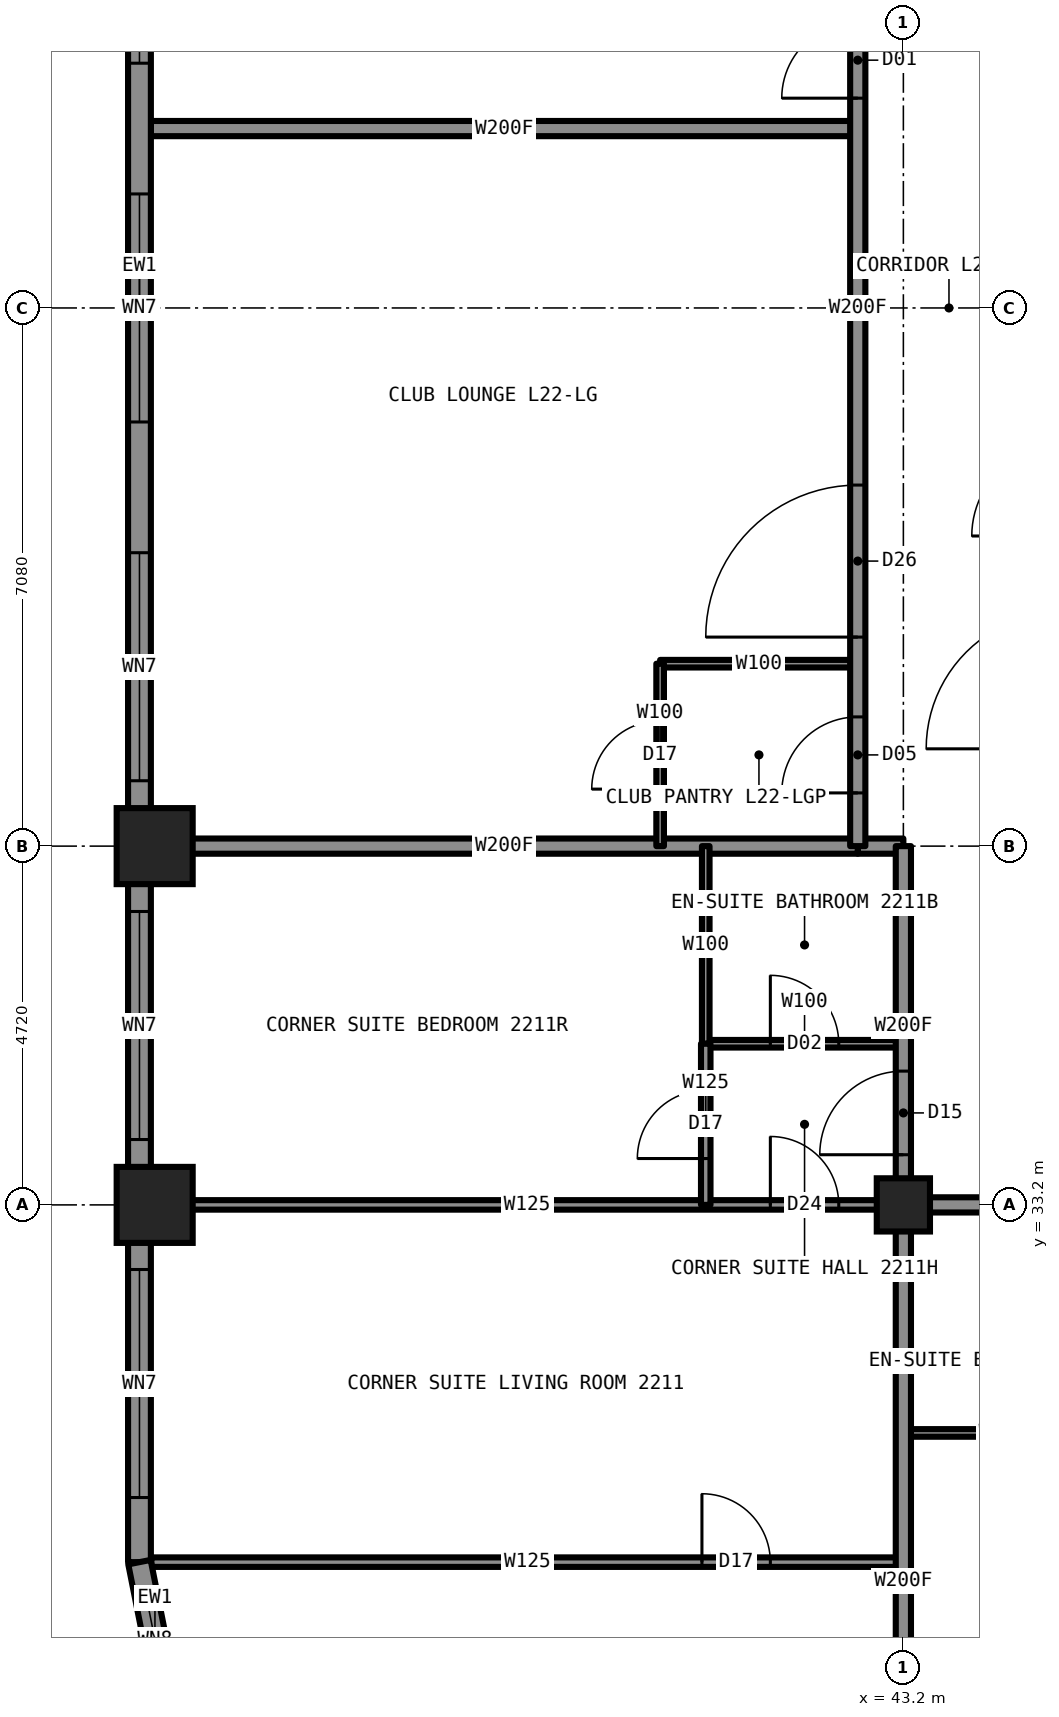
"""IFC4 building model, lengths in metres.
Left out: names, types, materials, properties, quantities, classifications, styles, units other than length and angle.
Written with IfcOpenShell. Run it as: python <this file> out.ifc"""

import sys

from ifc_helpers import new_model, si_unit, direction, frame, frame_2d, origin, origin_2d, place, context, subcontext, project, spatial, rectangle, hollow_rectangle, i_section, extrude, element, fill, save


model = new_model("IFC4")
c1 = context("Model", 3, precision=1e-05, world=origin(), true_north=direction((0.0, 1.0)))
c2 = subcontext(c1, "Body", "Model", "MODEL_VIEW")
j1 = project(units=[si_unit("LENGTHUNIT", "METRE"), si_unit("PLANEANGLEUNIT", "RADIAN")], contexts=[c1])
p1 = place(None, origin())
s1 = spatial("IfcSite", under=j1, at=p1, CompositionType="ELEMENT")
p2 = place(p1, origin())
s2 = spatial("IfcBuilding", under=s1, at=p2, CompositionType="ELEMENT")
p3 = place(p2, frame((0.0, 0.0, 81.0)))
s3 = spatial("IfcBuildingStorey", under=s2, at=p3, CompositionType="ELEMENT", Elevation=81.0)
for number, where, z_axis, x_axis in (
    (1, (33.35, 33.2, 0.0), (0.0, 0.0, 1.0), (1.0, 0.0, 0.0)),
    (2, (33.35, 37.92, 0.0), (0.0, 0.0, 1.0), (1.0, 0.0, 0.0)),
):
    element("IfcColumn", number, at=place(p3, frame(where, z_axis=z_axis, x_axis=x_axis)), inside=s3, PredefinedType="COLUMN", context=c2, shape_type="SweptSolid", body=[
        extrude(i_section(OverallWidth=0.432, OverallDepth=0.498, WebThickness=0.056, FlangeThickness=0.089, at=origin_2d()), origin(), (0.0, 0.0, 1.0), 3.5),
    ])
p4 = place(p3, frame((43.2, 33.2, 0.0), z_axis=(0.0, 0.0, 1.0), x_axis=(1.0, 0.0, 0.0)))
e3 = element("IfcColumn", 3, at=p4, inside=s3, PredefinedType="COLUMN", context=c2, shape_type="SweptSolid", body=[
    extrude(hollow_rectangle(XDim=0.7, YDim=0.7, WallThickness=0.06, at=origin_2d()), origin(), (0.0, 0.0, 1.0), 3.5),
])
p5 = place(p3, frame((43.2, 33.2, 0.0), z_axis=(0.0, 0.0, 1.0), x_axis=(1.0, 0.0, 0.0)))
e4 = element("IfcWall", 4, at=p5, inside=s3, PredefinedType="PARTITIONING", context=c2, shape_type="SweptSolid", body=[
    extrude(rectangle(XDim=23.6, YDim=0.2, at=frame_2d((11.8, 0.0))), origin(), (0.0, 0.0, 1.0), 3.33),
])
p6 = place(p5, frame((3.0, 0.0, 0.0)))
e5 = element("IfcOpeningElement", 5, at=p6, cuts=e4, PredefinedType="OPENING", context=c2, shape_type="SweptSolid", body=[
    extrude(rectangle(XDim=1.0, YDim=2.2, at=frame_2d((0.5, 1.1))), frame((0.0, 0.11, 0.0), z_axis=(0.0, -1.0, 0.0), x_axis=(1.0, 0.0, 0.0)), (0.0, 0.0, 1.0), 0.22),
])
p7 = place(p5, frame((11.29, 0.0, 0.0)))
e6 = element("IfcOpeningElement", 6, at=p7, cuts=e4, PredefinedType="OPENING", context=c2, shape_type="SweptSolid", body=[
    extrude(rectangle(XDim=1.1, YDim=2.2, at=frame_2d((0.55, 1.1))), frame((0.0, 0.11, 0.0), z_axis=(0.0, -1.0, 0.0), x_axis=(1.0, 0.0, 0.0)), (0.0, 0.0, 1.0), 0.22),
])
p8 = place(p3, frame((33.3, 33.2, 0.0), z_axis=(0.0, 0.0, 1.0), x_axis=(1.0, 0.0, 0.0)))
e7 = element("IfcWall", 7, at=p8, inside=s3, PredefinedType="PARTITIONING", context=c2, shape_type="SweptSolid", body=[
    extrude(rectangle(XDim=9.9, YDim=0.125, at=frame_2d((4.95, 0.0))), origin(), (0.0, 0.0, 1.0), 2.573),
])
p9 = place(p8, frame((8.15, 0.0, 0.0)))
e8 = element("IfcOpeningElement", 8, at=p9, cuts=e7, PredefinedType="OPENING", context=c2, shape_type="SweptSolid", body=[
    extrude(rectangle(XDim=0.9, YDim=2.2, at=frame_2d((0.45, 1.1))), frame((0.0, 0.073, 0.0), z_axis=(0.0, -1.0, 0.0), x_axis=(1.0, 0.0, 0.0)), (0.0, 0.0, 1.0), 0.145),
])
p10 = place(p3, frame((43.2, 30.2, 0.0), z_axis=(0.0, 0.0, 1.0), x_axis=(1.0, 0.0, 0.0)))
e9 = element("IfcWall", 9, at=p10, inside=s3, PredefinedType="PARTITIONING", context=c2, shape_type="SweptSolid", body=[
    extrude(rectangle(XDim=2.6, YDim=0.1, at=frame_2d((1.3, 0.0))), origin(), (0.0, 0.0, 1.0), 3.33),
])
p11 = place(p3, frame((33.306, 28.5, 0.0), z_axis=(0.0, 0.0, 1.0), x_axis=(1.0, 0.0, 0.0)))
e10 = element("IfcWall", 10, at=p11, inside=s3, PredefinedType="PARTITIONING", context=c2, shape_type="SweptSolid", body=[
    extrude(rectangle(XDim=9.894, YDim=0.125, at=frame_2d((4.947, 0.0))), origin(), (0.0, 0.0, 1.0), 3.33),
])
p12 = place(p11, frame((7.244, 0.0, 0.0)))
e11 = element("IfcOpeningElement", 11, at=p12, cuts=e10, PredefinedType="OPENING", context=c2, shape_type="SweptSolid", body=[
    extrude(rectangle(XDim=0.9, YDim=2.2, at=frame_2d((0.45, 1.1))), frame((0.0, 0.073, 0.0), z_axis=(0.0, -1.0, 0.0), x_axis=(1.0, 0.0, 0.0)), (0.0, 0.0, 1.0), 0.145),
])
p13 = place(p3, frame((40.0, 40.32, 0.0), z_axis=(0.0, 0.0, 1.0), x_axis=(1.0, 0.0, 0.0)))
e12 = element("IfcWall", 12, at=p13, inside=s3, PredefinedType="PARTITIONING", context=c2, shape_type="SweptSolid", body=[
    extrude(rectangle(XDim=2.6, YDim=0.1, at=frame_2d((1.3, 0.0))), origin(), (0.0, 0.0, 1.0), 2.723),
])
p14 = place(p3, frame((42.6, 37.92, 0.0), z_axis=(0.0, 0.0, 1.0), x_axis=(1.0, 0.0, 0.0)))
e13 = element("IfcWall", 13, at=p14, inside=s3, PredefinedType="PARTITIONING", context=c2, shape_type="SweptSolid", body=[
    extrude(rectangle(XDim=0.6, YDim=0.2, at=frame_2d((0.3, 0.0))), origin(), (0.0, 0.0, 1.0), 2.573),
])
p15 = place(p3, frame((33.3, 37.92, 0.0), z_axis=(0.0, 0.0, 1.0), x_axis=(1.0, 0.0, 0.0)))
e14 = element("IfcWall", 14, at=p15, inside=s3, PredefinedType="PARTITIONING", context=c2, shape_type="SweptSolid", body=[
    extrude(rectangle(XDim=9.3, YDim=0.2, at=frame_2d((4.65, 0.0))), origin(), (0.0, 0.0, 1.0), 2.573),
])
p16 = place(p3, frame((40.6, 35.32, 0.0), z_axis=(0.0, 0.0, 1.0), x_axis=(1.0, 0.0, 0.0)))
e15 = element("IfcWall", 15, at=p16, inside=s3, PredefinedType="PARTITIONING", context=c2, shape_type="SweptSolid", body=[
    extrude(rectangle(XDim=2.6, YDim=0.1, at=frame_2d((1.3, 0.0))), origin(), (0.0, 0.0, 1.0), 3.33),
])
p17 = place(p16, frame((0.85, 0.0, 0.0)))
e16 = element("IfcOpeningElement", 16, at=p17, cuts=e15, PredefinedType="OPENING", context=c2, shape_type="SweptSolid", body=[
    extrude(rectangle(XDim=0.9, YDim=2.1, at=frame_2d((0.45, 1.05))), frame((0.0, 0.06, 0.0), z_axis=(0.0, -1.0, 0.0), x_axis=(1.0, 0.0, 0.0)), (0.0, 0.0, 1.0), 0.12),
])
p18 = place(p3, frame((33.3, 47.36, 0.0), z_axis=(0.0, 0.0, 1.0), x_axis=(1.0, 0.0, 0.0)))
e17 = element("IfcWall", 17, at=p18, inside=s3, PredefinedType="PARTITIONING", context=c2, shape_type="SweptSolid", body=[
    extrude(rectangle(XDim=9.3, YDim=0.2, at=frame_2d((4.65, 0.0))), origin(), (0.0, 0.0, 1.0), 2.723),
])
p19 = place(p3, frame((43.2, 33.2, 0.0), z_axis=(0.0, 0.0, 1.0), x_axis=(0.0, 1.0, 0.0)))
e18 = element("IfcWall", 18, at=p19, inside=s3, PredefinedType="PARTITIONING", context=c2, shape_type="SweptSolid", body=[
    extrude(rectangle(XDim=4.72, YDim=0.2, at=frame_2d((2.36, 0.0))), origin(), (0.0, 0.0, 1.0), 3.33),
])
p20 = place(p19, frame((0.66, 0.0, 0.0)))
e19 = element("IfcOpeningElement", 19, at=p20, cuts=e18, PredefinedType="OPENING", context=c2, shape_type="SweptSolid", body=[
    extrude(rectangle(XDim=1.1, YDim=2.2, at=frame_2d((0.55, 1.1))), frame((0.0, 0.11, 0.0), z_axis=(0.0, -1.0, 0.0), x_axis=(1.0, 0.0, 0.0)), (0.0, 0.0, 1.0), 0.22),
])
p21 = place(p3, frame((43.2, 23.3, 0.0), z_axis=(0.0, 0.0, 1.0), x_axis=(0.0, 1.0, 0.0)))
e20 = element("IfcWall", 20, at=p21, inside=s3, PredefinedType="PARTITIONING", context=c2, shape_type="SweptSolid", body=[
    extrude(rectangle(XDim=9.9, YDim=0.2, at=frame_2d((4.95, 0.0))), origin(), (0.0, 0.0, 1.0), 2.573),
])
p22 = place(p3, frame((42.6, 37.92, 0.0), z_axis=(0.0, 0.0, 1.0), x_axis=(0.0, 1.0, 0.0)))
e21 = element("IfcWall", 21, at=p22, inside=s3, PredefinedType="PARTITIONING", context=c2, shape_type="SweptSolid", body=[
    extrude(rectangle(XDim=14.16, YDim=0.2, at=frame_2d((7.08, 0.0))), origin(), (0.0, 0.0, 1.0), 3.33),
])
p23 = place(p22, frame((9.84, 0.0, 0.0)))
e22 = element("IfcOpeningElement", 22, at=p23, cuts=e21, PredefinedType="OPENING", context=c2, shape_type="SweptSolid", body=[
    extrude(rectangle(XDim=1.0, YDim=2.2, at=frame_2d((0.5, 1.1))), frame((0.0, 0.11, 0.0), z_axis=(0.0, -1.0, 0.0), x_axis=(1.0, 0.0, 0.0)), (0.0, 0.0, 1.0), 0.22),
])
p24 = place(p22, frame((2.75, 0.0, 0.0)))
e23 = element("IfcOpeningElement", 23, at=p24, cuts=e21, PredefinedType="OPENING", context=c2, shape_type="SweptSolid", body=[
    extrude(rectangle(XDim=2.0, YDim=2.4, at=frame_2d((1.0, 1.2))), frame((0.0, 0.11, 0.0), z_axis=(0.0, -1.0, 0.0), x_axis=(1.0, 0.0, 0.0)), (0.0, 0.0, 1.0), 0.22),
])
p25 = place(p22, frame((0.7, 0.0, 0.0)))
e24 = element("IfcOpeningElement", 24, at=p25, cuts=e21, PredefinedType="OPENING", context=c2, shape_type="SweptSolid", body=[
    extrude(rectangle(XDim=1.0, YDim=2.1, at=frame_2d((0.5, 1.05))), frame((0.0, 0.11, 0.0), z_axis=(0.0, -1.0, 0.0), x_axis=(1.0, 0.0, 0.0)), (0.0, 0.0, 1.0), 0.22),
])
p26 = place(p3, frame((40.6, 35.32, 0.0), z_axis=(0.0, 0.0, 1.0), x_axis=(0.0, 1.0, 0.0)))
e25 = element("IfcWall", 25, at=p26, inside=s3, PredefinedType="PARTITIONING", context=c2, shape_type="SweptSolid", body=[
    extrude(rectangle(XDim=2.6, YDim=0.1, at=frame_2d((1.3, 0.0))), origin(), (0.0, 0.0, 1.0), 3.33),
])
p27 = place(p3, frame((40.6, 33.2, 0.0), z_axis=(0.0, 0.0, 1.0), x_axis=(0.0, 1.0, 0.0)))
e26 = element("IfcWall", 26, at=p27, inside=s3, PredefinedType="PARTITIONING", context=c2, shape_type="SweptSolid", body=[
    extrude(rectangle(XDim=2.12, YDim=0.125, at=frame_2d((1.06, 0.0))), origin(), (0.0, 0.0, 1.0), 3.33),
])
p28 = place(p27, frame((0.61, 0.0, 0.0)))
e27 = element("IfcOpeningElement", 27, at=p28, cuts=e26, PredefinedType="OPENING", context=c2, shape_type="SweptSolid", body=[
    extrude(rectangle(XDim=0.9, YDim=2.2, at=frame_2d((0.45, 1.1))), frame((0.0, 0.073, 0.0), z_axis=(0.0, -1.0, 0.0), x_axis=(1.0, 0.0, 0.0)), (0.0, 0.0, 1.0), 0.145),
])
p29 = place(p3, frame((40.0, 37.92, 0.0), z_axis=(0.0, 0.0, 1.0), x_axis=(0.0, 1.0, 0.0)))
e28 = element("IfcWall", 28, at=p29, inside=s3, PredefinedType="PARTITIONING", context=c2, shape_type="SweptSolid", body=[
    extrude(rectangle(XDim=2.4, YDim=0.1, at=frame_2d((1.2, 0.0))), origin(), (0.0, 0.0, 1.0), 3.33),
])
p30 = place(p29, frame((0.75, 0.0, 0.0)))
e29 = element("IfcOpeningElement", 29, at=p30, cuts=e28, PredefinedType="OPENING", context=c2, shape_type="SweptSolid", body=[
    extrude(rectangle(XDim=0.9, YDim=2.2, at=frame_2d((0.45, 1.1))), frame((0.0, 0.06, 0.0), z_axis=(0.0, -1.0, 0.0), x_axis=(1.0, 0.0, 0.0)), (0.0, 0.0, 1.0), 0.12),
])
p31 = place(p3, frame((33.15, 61.5, 0.0), z_axis=(0.0, 0.0, 1.0), x_axis=(0.0, -1.0, 0.0)))
e30 = element("IfcWall", 30, at=p31, inside=s3, PredefinedType="SOLIDWALL", context=c2, shape_type="SweptSolid", body=[
    extrude(rectangle(XDim=33.0, YDim=0.3, at=frame_2d((16.5, 0.0))), origin(), (0.0, 0.0, 1.0), 2.63),
])
p32 = place(p31, frame((0.85, 0.0, 0.5)))
e31 = element("IfcOpeningElement", 31, at=p32, cuts=e30, PredefinedType="OPENING", context=c2, shape_type="SweptSolid", body=[
    extrude(rectangle(XDim=3.0, YDim=2.0, at=frame_2d((1.5, 1.0))), frame((0.0, 0.16, 0.0), z_axis=(0.0, -1.0, 0.0), x_axis=(1.0, 0.0, 0.0)), (0.0, 0.0, 1.0), 0.32),
])
p33 = place(p31, frame((5.56, 0.0, 0.5)))
e32 = element("IfcOpeningElement", 32, at=p33, cuts=e30, PredefinedType="OPENING", context=c2, shape_type="SweptSolid", body=[
    extrude(rectangle(XDim=3.0, YDim=2.0, at=frame_2d((1.5, 1.0))), frame((0.0, 0.16, 0.0), z_axis=(0.0, -1.0, 0.0), x_axis=(1.0, 0.0, 0.0)), (0.0, 0.0, 1.0), 0.32),
])
p34 = place(p31, frame((10.28, 0.0, 0.5)))
e33 = element("IfcOpeningElement", 33, at=p34, cuts=e30, PredefinedType="OPENING", context=c2, shape_type="SweptSolid", body=[
    extrude(rectangle(XDim=3.0, YDim=2.0, at=frame_2d((1.5, 1.0))), frame((0.0, 0.16, 0.0), z_axis=(0.0, -1.0, 0.0), x_axis=(1.0, 0.0, 0.0)), (0.0, 0.0, 1.0), 0.32),
])
p35 = place(p31, frame((15.0, 0.0, 0.5)))
e34 = element("IfcOpeningElement", 34, at=p35, cuts=e30, PredefinedType="OPENING", context=c2, shape_type="SweptSolid", body=[
    extrude(rectangle(XDim=3.0, YDim=2.0, at=frame_2d((1.5, 1.0))), frame((0.0, 0.16, 0.0), z_axis=(0.0, -1.0, 0.0), x_axis=(1.0, 0.0, 0.0)), (0.0, 0.0, 1.0), 0.32),
])
p36 = place(p31, frame((19.72, 0.0, 0.5)))
e35 = element("IfcOpeningElement", 35, at=p36, cuts=e30, PredefinedType="OPENING", context=c2, shape_type="SweptSolid", body=[
    extrude(rectangle(XDim=3.0, YDim=2.0, at=frame_2d((1.5, 1.0))), frame((0.0, 0.16, 0.0), z_axis=(0.0, -1.0, 0.0), x_axis=(1.0, 0.0, 0.0)), (0.0, 0.0, 1.0), 0.32),
])
p37 = place(p31, frame((24.44, 0.0, 0.5)))
e36 = element("IfcOpeningElement", 36, at=p37, cuts=e30, PredefinedType="OPENING", context=c2, shape_type="SweptSolid", body=[
    extrude(rectangle(XDim=3.0, YDim=2.0, at=frame_2d((1.5, 1.0))), frame((0.0, 0.16, 0.0), z_axis=(0.0, -1.0, 0.0), x_axis=(1.0, 0.0, 0.0)), (0.0, 0.0, 1.0), 0.32),
])
p38 = place(p31, frame((29.15, 0.0, 0.5)))
e37 = element("IfcOpeningElement", 37, at=p38, cuts=e30, PredefinedType="OPENING", context=c2, shape_type="SweptSolid", body=[
    extrude(rectangle(XDim=3.0, YDim=2.0, at=frame_2d((1.5, 1.0))), frame((0.0, 0.16, 0.0), z_axis=(0.0, -1.0, 0.0), x_axis=(1.0, 0.0, 0.0)), (0.0, 0.0, 1.0), 0.32),
])
p39 = place(p3, frame((33.15, 28.5, 0.0), z_axis=(0.0, 0.0, 1.0), x_axis=(0.195081421501, -0.980787050784, 0.0)))
e38 = element("IfcWall", 38, at=p39, inside=s3, PredefinedType="SOLIDWALL", context=c2, shape_type="SweptSolid", body=[
    extrude(rectangle(XDim=2.087, YDim=0.3, at=frame_2d((1.044, 0.0))), origin(), (0.0, 0.0, 1.0), 3.33),
])
p40 = place(p39, frame((0.444, 0.0, 1.65)))
e39 = element("IfcOpeningElement", 39, at=p40, cuts=e38, PredefinedType="OPENING", context=c2, shape_type="SweptSolid", body=[
    extrude(rectangle(XDim=0.6, YDim=0.8, at=frame_2d((0.3, 0.4))), frame((0.0, 0.16, 0.0), z_axis=(0.0, -1.0, 0.0), x_axis=(1.0, 0.0, 0.0)), (0.0, 0.0, 1.0), 0.32),
])
p41 = place(p23, origin())
e40 = element("IfcDoor", 40, at=p41, inside=s3, OperationType="SINGLE_SWING_LEFT", PredefinedType="DOOR", context=c2, shape_type="SweptSolid", body=[
    extrude(rectangle(XDim=1.0, YDim=2.2, at=frame_2d((0.5, 1.1))), frame((0.0, 0.025, 0.0), z_axis=(0.0, -1.0, 0.0), x_axis=(1.0, 0.0, 0.0)), (0.0, 0.0, 1.0), 0.05),
])
fill(e22, e40)
p42 = place(p9, origin())
e41 = element("IfcDoor", 41, at=p42, inside=s3, OperationType="SINGLE_SWING_LEFT", PredefinedType="DOOR", context=c2, shape_type="SweptSolid", body=[
    extrude(rectangle(XDim=0.9, YDim=2.2, at=frame_2d((0.45, 1.1))), frame((0.0, 0.025, 0.0), z_axis=(0.0, -1.0, 0.0), x_axis=(1.0, 0.0, 0.0)), (0.0, 0.0, 1.0), 0.05),
])
fill(e8, e41)
p43 = place(p17, origin())
e42 = element("IfcDoor", 42, at=p43, inside=s3, OperationType="SINGLE_SWING_RIGHT", PredefinedType="DOOR", context=c2, shape_type="SweptSolid", body=[
    extrude(rectangle(XDim=0.9, YDim=2.1, at=frame_2d((0.45, 1.05))), frame((0.0, 0.025, 0.0), z_axis=(0.0, -1.0, 0.0), x_axis=(1.0, 0.0, 0.0)), (0.0, 0.0, 1.0), 0.05),
])
fill(e16, e42)
p44 = place(p20, origin())
e43 = element("IfcDoor", 43, at=p44, inside=s3, OperationType="SINGLE_SWING_LEFT", PredefinedType="DOOR", context=c2, shape_type="SweptSolid", body=[
    extrude(rectangle(XDim=1.1, YDim=2.2, at=frame_2d((0.55, 1.1))), frame((0.0, 0.025, 0.0), z_axis=(0.0, -1.0, 0.0), x_axis=(1.0, 0.0, 0.0)), (0.0, 0.0, 1.0), 0.05),
])
fill(e19, e43)
p45 = place(p12, origin())
e44 = element("IfcDoor", 44, at=p45, inside=s3, OperationType="SINGLE_SWING_LEFT", PredefinedType="DOOR", context=c2, shape_type="SweptSolid", body=[
    extrude(rectangle(XDim=0.9, YDim=2.2, at=frame_2d((0.45, 1.1))), frame((0.0, 0.025, 0.0), z_axis=(0.0, -1.0, 0.0), x_axis=(1.0, 0.0, 0.0)), (0.0, 0.0, 1.0), 0.05),
])
fill(e11, e44)
p46 = place(p28, origin())
e45 = element("IfcDoor", 45, at=p46, inside=s3, OperationType="SINGLE_SWING_LEFT", PredefinedType="DOOR", context=c2, shape_type="SweptSolid", body=[
    extrude(rectangle(XDim=0.9, YDim=2.2, at=frame_2d((0.45, 1.1))), frame((0.0, 0.025, 0.0), z_axis=(0.0, -1.0, 0.0), x_axis=(1.0, 0.0, 0.0)), (0.0, 0.0, 1.0), 0.05),
])
fill(e27, e45)
p47 = place(p24, origin())
e46 = element("IfcDoor", 46, at=p47, inside=s3, OperationType="DOUBLE_DOOR_SINGLE_SWING", PredefinedType="DOOR", context=c2, shape_type="SweptSolid", body=[
    extrude(rectangle(XDim=2.0, YDim=2.4, at=frame_2d((1.0, 1.2))), frame((0.0, 0.025, 0.0), z_axis=(0.0, -1.0, 0.0), x_axis=(1.0, 0.0, 0.0)), (0.0, 0.0, 1.0), 0.05),
])
fill(e23, e46)
p48 = place(p30, origin())
e47 = element("IfcDoor", 47, at=p48, inside=s3, OperationType="SINGLE_SWING_LEFT", PredefinedType="DOOR", context=c2, shape_type="SweptSolid", body=[
    extrude(rectangle(XDim=0.9, YDim=2.2, at=frame_2d((0.45, 1.1))), frame((0.0, 0.025, 0.0), z_axis=(0.0, -1.0, 0.0), x_axis=(1.0, 0.0, 0.0)), (0.0, 0.0, 1.0), 0.05),
])
fill(e29, e47)
p49 = place(p25, origin())
e48 = element("IfcDoor", 48, at=p49, inside=s3, OperationType="SINGLE_SWING_LEFT", PredefinedType="DOOR", context=c2, shape_type="SweptSolid", body=[
    extrude(rectangle(XDim=1.0, YDim=2.1, at=frame_2d((0.5, 1.05))), frame((0.0, 0.025, 0.0), z_axis=(0.0, -1.0, 0.0), x_axis=(1.0, 0.0, 0.0)), (0.0, 0.0, 1.0), 0.05),
])
fill(e24, e48)
p50 = place(p34, origin())
e49 = element("IfcWindow", 49, at=p50, inside=s3, PartitioningType="SINGLE_PANEL", PredefinedType="WINDOW", context=c2, shape_type="SweptSolid", body=[
    extrude(rectangle(XDim=3.0, YDim=2.0, at=frame_2d((1.5, 1.0))), frame((0.0, 0.03, 0.0), z_axis=(0.0, -1.0, 0.0), x_axis=(1.0, 0.0, 0.0)), (0.0, 0.0, 1.0), 0.06),
])
fill(e33, e49)
p51 = place(p35, origin())
e50 = element("IfcWindow", 50, at=p51, inside=s3, PartitioningType="SINGLE_PANEL", PredefinedType="WINDOW", context=c2, shape_type="SweptSolid", body=[
    extrude(rectangle(XDim=3.0, YDim=2.0, at=frame_2d((1.5, 1.0))), frame((0.0, 0.03, 0.0), z_axis=(0.0, -1.0, 0.0), x_axis=(1.0, 0.0, 0.0)), (0.0, 0.0, 1.0), 0.06),
])
fill(e34, e50)
p52 = place(p36, origin())
e51 = element("IfcWindow", 51, at=p52, inside=s3, PartitioningType="SINGLE_PANEL", PredefinedType="WINDOW", context=c2, shape_type="SweptSolid", body=[
    extrude(rectangle(XDim=3.0, YDim=2.0, at=frame_2d((1.5, 1.0))), frame((0.0, 0.03, 0.0), z_axis=(0.0, -1.0, 0.0), x_axis=(1.0, 0.0, 0.0)), (0.0, 0.0, 1.0), 0.06),
])
fill(e35, e51)
p53 = place(p37, origin())
e52 = element("IfcWindow", 52, at=p53, inside=s3, PartitioningType="SINGLE_PANEL", PredefinedType="WINDOW", context=c2, shape_type="SweptSolid", body=[
    extrude(rectangle(XDim=3.0, YDim=2.0, at=frame_2d((1.5, 1.0))), frame((0.0, 0.03, 0.0), z_axis=(0.0, -1.0, 0.0), x_axis=(1.0, 0.0, 0.0)), (0.0, 0.0, 1.0), 0.06),
])
fill(e36, e52)
p54 = place(p38, origin())
e53 = element("IfcWindow", 53, at=p54, inside=s3, PartitioningType="SINGLE_PANEL", PredefinedType="WINDOW", context=c2, shape_type="SweptSolid", body=[
    extrude(rectangle(XDim=3.0, YDim=2.0, at=frame_2d((1.5, 1.0))), frame((0.0, 0.03, 0.0), z_axis=(0.0, -1.0, 0.0), x_axis=(1.0, 0.0, 0.0)), (0.0, 0.0, 1.0), 0.06),
])
fill(e37, e53)
p55 = place(p40, origin())
e54 = element("IfcWindow", 54, at=p55, inside=s3, PartitioningType="SINGLE_PANEL", PredefinedType="WINDOW", context=c2, shape_type="SweptSolid", body=[
    extrude(rectangle(XDim=0.6, YDim=0.8, at=frame_2d((0.3, 0.4))), frame((0.0, 0.03, 0.0), z_axis=(0.0, -1.0, 0.0), x_axis=(1.0, 0.0, 0.0)), (0.0, 0.0, 1.0), 0.06),
])
fill(e39, e54)
save(model, sys.argv[1])
